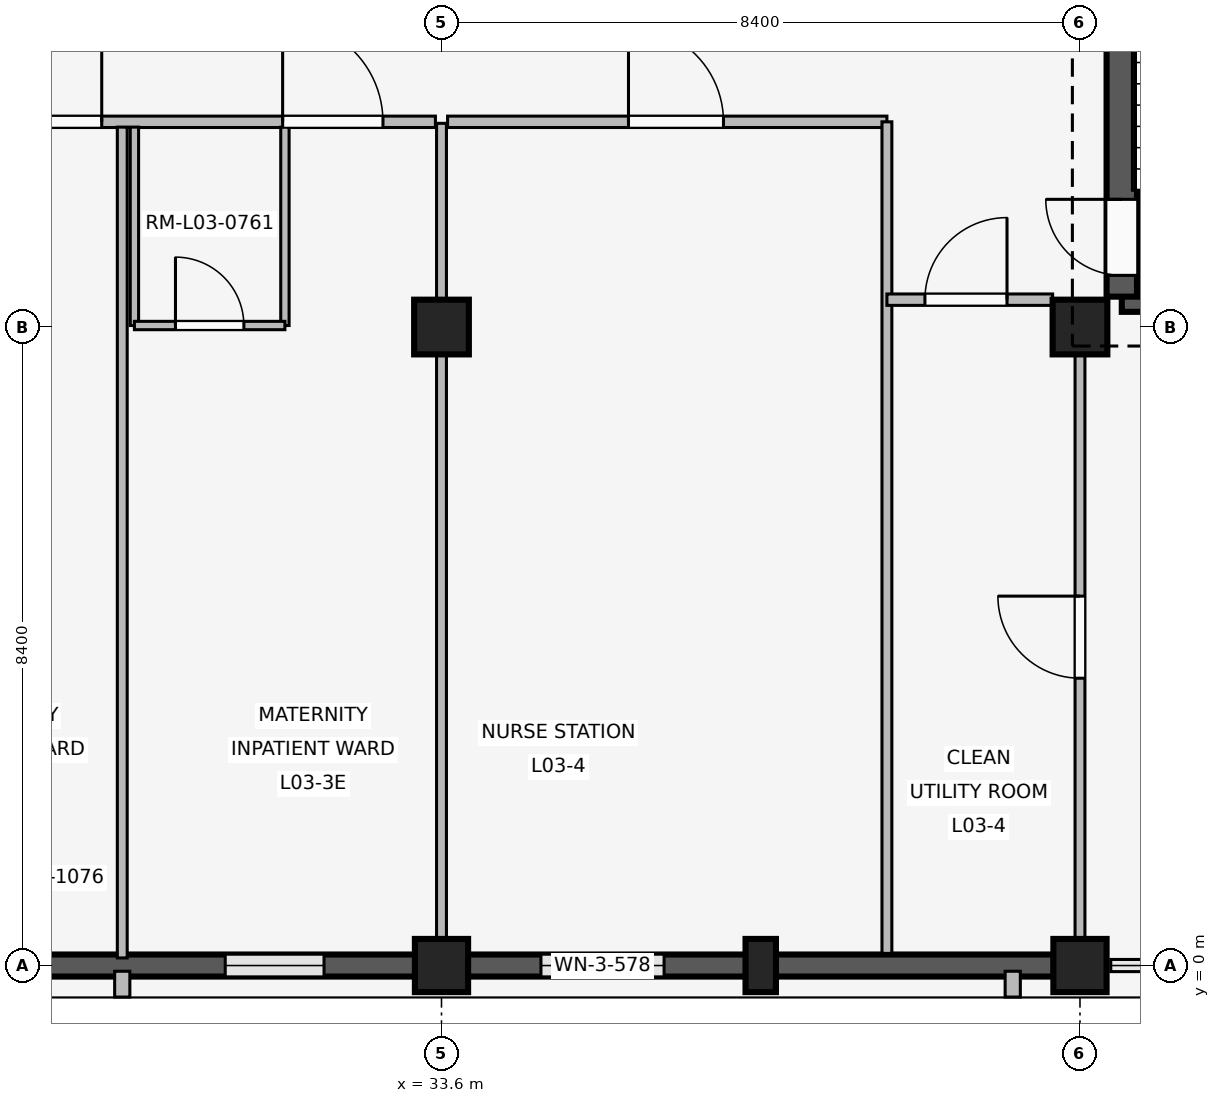
"""IFC4 building model, lengths in metres.
Left out: names, types, materials, properties, quantities, classifications, styles, units other than length and angle.
Written with IfcOpenShell. Run it as: python <this file> out.ifc"""

import sys

from ifc_helpers import new_model, si_unit, direction, frame, frame_2d, origin, origin_2d, place, context, subcontext, project, spatial, rectangle, extrude, element, fill, save


model = new_model("IFC4")
c1 = context("Model", 3, precision=1e-05, world=origin(), true_north=direction((0.0, 1.0)))
c2 = subcontext(c1, "Body", "Model", "MODEL_VIEW")
j1 = project(units=[si_unit("LENGTHUNIT", "METRE"), si_unit("PLANEANGLEUNIT", "RADIAN")], contexts=[c1])
p1 = place(None, origin())
s1 = spatial("IfcSite", under=j1, at=p1, CompositionType="ELEMENT")
p2 = place(p1, origin())
s2 = spatial("IfcBuilding", under=s1, at=p2, CompositionType="ELEMENT")
p3 = place(p2, frame((0.0, 0.0, 12.9)))
s3 = spatial("IfcBuildingStorey", under=s2, at=p3, CompositionType="ELEMENT", Elevation=12.9)
p4 = place(p3, frame((33.6, 0.0, 0.0), z_axis=(0.0, 0.0, 1.0), x_axis=(1.0, 0.0, 0.0)))
e1 = element("IfcColumn", 1, at=p4, inside=s3, PredefinedType="COLUMN", context=c2, shape_type="SweptSolid", body=[
    extrude(rectangle(XDim=0.7, YDim=0.7, at=origin_2d()), origin(), (0.0, 0.0, 1.0), 3.3),
])
p5 = place(p3, frame((33.6, 8.4, 0.0), z_axis=(0.0, 0.0, 1.0), x_axis=(1.0, 0.0, 0.0)))
e2 = element("IfcColumn", 2, at=p5, inside=s3, PredefinedType="COLUMN", context=c2, shape_type="SweptSolid", body=[
    extrude(rectangle(XDim=0.72, YDim=0.72, at=origin_2d()), origin(), (0.0, 0.0, 1.0), 3.3),
])
p6 = place(p3, frame((42.0, 0.0, 0.0), z_axis=(0.0, 0.0, 1.0), x_axis=(1.0, 0.0, 0.0)))
e3 = element("IfcColumn", 3, at=p6, inside=s3, PredefinedType="COLUMN", context=c2, shape_type="SweptSolid", body=[
    extrude(rectangle(XDim=0.7, YDim=0.7, at=origin_2d()), origin(), (0.0, 0.0, 1.0), 3.3),
])
p7 = place(p3, frame((42.0, 8.4, 0.0), z_axis=(0.0, 0.0, 1.0), x_axis=(1.0, 0.0, 0.0)))
e4 = element("IfcColumn", 4, at=p7, inside=s3, PredefinedType="COLUMN", context=c2, shape_type="SweptSolid", body=[
    extrude(rectangle(XDim=0.72, YDim=0.72, at=origin_2d()), origin(), (0.0, 0.0, 1.0), 3.3),
])
p8 = place(p3, frame((37.8, 0.0, 0.0), z_axis=(0.0, 0.0, 1.0), x_axis=(1.0, 0.0, 0.0)))
e5 = element("IfcColumn", 5, at=p8, inside=s3, PredefinedType="PILASTER", context=c2, shape_type="SweptSolid", body=[
    extrude(rectangle(XDim=0.4, YDim=0.7, at=origin_2d()), origin(), (0.0, 0.0, 1.0), 3.3),
])
p9 = place(p3, frame((33.255, 0.0, 0.0), z_axis=(0.0, 0.0, 1.0), x_axis=(-1.0, 0.0, 0.0)))
e6 = element("IfcWall", 6, at=p9, inside=s3, PredefinedType="SOLIDWALL", context=c2, shape_type="SweptSolid", body=[
    extrude(rectangle(XDim=7.71, YDim=0.29, at=frame_2d((3.855, 0.0))), origin(), (0.0, 0.0, 1.0), 2.44),
])
p10 = place(p9, frame((1.2, 0.0, 1.05)))
e7 = element("IfcOpeningElement", 7, at=p10, cuts=e6, PredefinedType="OPENING", context=c2, shape_type="SweptSolid", body=[
    extrude(rectangle(XDim=1.3, YDim=0.75, at=frame_2d((0.65, 0.375))), frame((0.0, 0.155, 0.0), z_axis=(0.0, -1.0, 0.0), x_axis=(1.0, 0.0, 0.0)), (0.0, 0.0, 1.0), 0.31),
])
p11 = place(p9, frame((5.21, 0.0, 1.05)))
e8 = element("IfcOpeningElement", 8, at=p11, cuts=e6, PredefinedType="OPENING", context=c2, shape_type="SweptSolid", body=[
    extrude(rectangle(XDim=1.3, YDim=0.75, at=frame_2d((0.65, 0.375))), frame((0.0, 0.155, 0.0), z_axis=(0.0, -1.0, 0.0), x_axis=(1.0, 0.0, 0.0)), (0.0, 0.0, 1.0), 0.31),
])
p12 = place(p3, frame((29.4, -0.075, 0.0), z_axis=(0.0, 0.0, 1.0), x_axis=(0.0, -1.0, 0.0)))
e9 = element("IfcWall", 9, at=p12, inside=s3, PredefinedType="ELEMENTEDWALL", context=c2, shape_type="SweptSolid", body=[
    extrude(rectangle(XDim=0.34, YDim=0.2, at=frame_2d((0.17, 0.0))), origin(), (0.0, 0.0, 1.0), 2.42),
])
p13 = place(p3, frame((41.655, 0.0, 0.0), z_axis=(0.0, 0.0, 1.0), x_axis=(-1.0, 0.0, 0.0)))
e10 = element("IfcWall", 10, at=p13, inside=s3, PredefinedType="SOLIDWALL", context=c2, shape_type="SweptSolid", body=[
    extrude(rectangle(XDim=7.71, YDim=0.29, at=frame_2d((3.855, 0.0))), origin(), (0.0, 0.0, 1.0), 2.44),
])
p14 = place(p13, frame((5.127, 0.0, 0.85)))
e11 = element("IfcOpeningElement", 11, at=p14, cuts=e10, PredefinedType="OPENING", context=c2, shape_type="SweptSolid", body=[
    extrude(rectangle(XDim=1.62, YDim=0.95, at=frame_2d((0.81, 0.475))), frame((0.0, 0.155, 0.0), z_axis=(0.0, -1.0, 0.0), x_axis=(1.0, 0.0, 0.0)), (0.0, 0.0, 1.0), 0.31),
])
p15 = place(p3, frame((41.115, -0.075, 0.0), z_axis=(0.0, 0.0, 1.0), x_axis=(0.0, -1.0, 0.0)))
e12 = element("IfcWall", 12, at=p15, inside=s3, PredefinedType="ELEMENTEDWALL", context=c2, shape_type="SweptSolid", body=[
    extrude(rectangle(XDim=0.34, YDim=0.2, at=frame_2d((0.17, 0.0))), origin(), (0.0, 0.0, 1.0), 2.42),
])
p16 = place(p3, frame((42.55, 8.8, 0.0), z_axis=(0.0, 0.0, 1.0), x_axis=(1.0, 0.0, 0.0)))
e13 = element("IfcWall", 13, at=p16, inside=s3, PredefinedType="SHEAR", context=c2, shape_type="SweptSolid", body=[
    extrude(rectangle(XDim=7.5, YDim=0.4, at=frame_2d((3.75, 0.0))), origin(), (0.0, 0.0, 1.0), 3.02),
])
p17 = place(p16, frame((4.85, 0.0, 0.0)))
e14 = element("IfcOpeningElement", 14, at=p17, cuts=e13, PredefinedType="OPENING", context=c2, shape_type="SweptSolid", body=[
    extrude(rectangle(XDim=1.2, YDim=2.2, at=frame_2d((0.6, 1.1))), frame((0.0, 0.21, 0.0), z_axis=(0.0, -1.0, 0.0), x_axis=(1.0, 0.0, 0.0)), (0.0, 0.0, 1.0), 0.42),
])
p18 = place(p3, frame((42.55, 8.8, 0.0), z_axis=(0.0, 0.0, 1.0), x_axis=(0.0, 1.0, 0.0)))
e15 = element("IfcWall", 15, at=p18, inside=s3, PredefinedType="SHEAR", context=c2, shape_type="SweptSolid", body=[
    extrude(rectangle(XDim=7.55, YDim=0.4, at=frame_2d((3.775, 0.0))), origin(), (0.0, 0.0, 1.0), 3.02),
])
p19 = place(p18, frame((0.28, 0.0, 0.0)))
e16 = element("IfcOpeningElement", 16, at=p19, cuts=e15, PredefinedType="OPENING", context=c2, shape_type="SweptSolid", body=[
    extrude(rectangle(XDim=1.0, YDim=2.15, at=frame_2d((0.5, 1.075))), frame((0.0, 0.21, 0.0), z_axis=(0.0, -1.0, 0.0), x_axis=(1.0, 0.0, 0.0)), (0.0, 0.0, 1.0), 0.42),
])
p20 = place(p3, frame((25.28, 11.1, 0.0), z_axis=(0.0, 0.0, 1.0), x_axis=(1.0, 0.0, 0.0)))
e17 = element("IfcWall", 17, at=p20, inside=s3, PredefinedType="PARTITIONING", context=c2, shape_type="SweptSolid", body=[
    extrude(rectangle(XDim=8.24, YDim=0.15, at=frame_2d((4.12, 0.0))), origin(), (0.0, 0.0, 1.0), 2.42),
])
p21 = place(p20, frame((2.53, 0.0, 0.0)))
e18 = element("IfcOpeningElement", 18, at=p21, cuts=e17, PredefinedType="OPENING", context=c2, shape_type="SweptSolid", body=[
    extrude(rectangle(XDim=1.32, YDim=2.25, at=frame_2d((0.66, 1.125))), frame((0.0, 0.085, 0.0), z_axis=(0.0, -1.0, 0.0), x_axis=(1.0, 0.0, 0.0)), (0.0, 0.0, 1.0), 0.17),
])
p22 = place(p20, frame((6.23, 0.0, 0.0)))
e19 = element("IfcOpeningElement", 19, at=p22, cuts=e17, PredefinedType="OPENING", context=c2, shape_type="SweptSolid", body=[
    extrude(rectangle(XDim=1.32, YDim=2.25, at=frame_2d((0.66, 1.125))), frame((0.0, 0.085, 0.0), z_axis=(0.0, -1.0, 0.0), x_axis=(1.0, 0.0, 0.0)), (0.0, 0.0, 1.0), 0.17),
])
p23 = place(p3, frame((29.4, 0.1, 0.0), z_axis=(0.0, 0.0, 1.0), x_axis=(0.0, 1.0, 0.0)))
e20 = element("IfcWall", 20, at=p23, inside=s3, PredefinedType="PARTITIONING", context=c2, shape_type="SweptSolid", body=[
    extrude(rectangle(XDim=10.93, YDim=0.13, at=frame_2d((5.465, 0.0))), origin(), (0.0, 0.0, 1.0), 2.42),
])
for number, where, z_axis, x_axis in (
    (21, (29.56, 8.42, 0.0), (0.0, 0.0, 1.0), (0.0, 1.0, 0.0)),
    (22, (31.54, 8.42, 0.0), (0.0, 0.0, 1.0), (0.0, 1.0, 0.0)),
):
    element("IfcWall", number, at=place(p3, frame(where, z_axis=z_axis, x_axis=x_axis)), inside=s3, PredefinedType="PARTITIONING", context=c2, shape_type="SweptSolid", body=[
        extrude(rectangle(XDim=2.61, YDim=0.11, at=frame_2d((1.305, 0.0))), origin(), (0.0, 0.0, 1.0), 2.42),
    ])
p24 = place(p3, frame((29.56, 8.42, 0.0), z_axis=(0.0, 0.0, 1.0), x_axis=(1.0, 0.0, 0.0)))
e23 = element("IfcWall", 23, at=p24, inside=s3, PredefinedType="PARTITIONING", context=c2, shape_type="SweptSolid", body=[
    extrude(rectangle(XDim=1.98, YDim=0.11, at=frame_2d((0.99, 0.0))), origin(), (0.0, 0.0, 1.0), 2.42),
])
p25 = place(p24, frame((0.54, 0.0, 0.0)))
e24 = element("IfcOpeningElement", 24, at=p25, cuts=e23, PredefinedType="OPENING", context=c2, shape_type="SweptSolid", body=[
    extrude(rectangle(XDim=0.9, YDim=2.1, at=frame_2d((0.45, 1.05))), frame((0.0, 0.065, 0.0), z_axis=(0.0, -1.0, 0.0), x_axis=(1.0, 0.0, 0.0)), (0.0, 0.0, 1.0), 0.13),
])
p26 = place(p3, frame((28.05, 1.15, 0.0), z_axis=(0.0, 0.0, 1.0), x_axis=(1.0, 0.0, 0.0)))
e25 = element("IfcWall", 25, at=p26, inside=s3, PredefinedType="PLUMBINGWALL", context=c2, shape_type="SweptSolid", body=[
    extrude(rectangle(XDim=0.9, YDim=0.24, at=frame_2d((0.45, 0.0))), origin(), (0.0, 0.0, 1.0), 2.42),
])
p27 = place(p3, frame((33.6, 0.14, 0.0), z_axis=(0.0, 0.0, 1.0), x_axis=(0.0, 1.0, 0.0)))
e26 = element("IfcWall", 26, at=p27, inside=s3, PredefinedType="PARTITIONING", context=c2, shape_type="SweptSolid", body=[
    extrude(rectangle(XDim=10.94, YDim=0.13, at=frame_2d((5.47, 0.0))), origin(), (0.0, 0.0, 1.0), 2.42),
])
p28 = place(p3, frame((33.68, 11.1, 0.0), z_axis=(0.0, 0.0, 1.0), x_axis=(1.0, 0.0, 0.0)))
e27 = element("IfcWall", 27, at=p28, inside=s3, PredefinedType="PARTITIONING", context=c2, shape_type="SweptSolid", body=[
    extrude(rectangle(XDim=5.78, YDim=0.15, at=frame_2d((2.89, 0.0))), origin(), (0.0, 0.0, 1.0), 2.42),
])
p29 = place(p28, frame((2.38, 0.0, 0.0)))
e28 = element("IfcOpeningElement", 28, at=p29, cuts=e27, PredefinedType="OPENING", context=c2, shape_type="SweptSolid", body=[
    extrude(rectangle(XDim=1.25, YDim=2.2, at=frame_2d((0.625, 1.1))), frame((0.0, 0.085, 0.0), z_axis=(0.0, -1.0, 0.0), x_axis=(1.0, 0.0, 0.0)), (0.0, 0.0, 1.0), 0.17),
])
p30 = place(p3, frame((39.46, 0.16, 0.0), z_axis=(0.0, 0.0, 1.0), x_axis=(0.0, 1.0, 0.0)))
e29 = element("IfcWall", 29, at=p30, inside=s3, PredefinedType="PARTITIONING", context=c2, shape_type="SweptSolid", body=[
    extrude(rectangle(XDim=10.94, YDim=0.13, at=frame_2d((5.47, 0.0))), origin(), (0.0, 0.0, 1.0), 2.42),
])
p31 = place(p3, frame((39.46, 8.76, 0.0), z_axis=(0.0, 0.0, 1.0), x_axis=(1.0, 0.0, 0.0)))
e30 = element("IfcWall", 30, at=p31, inside=s3, PredefinedType="PARTITIONING", context=c2, shape_type="SweptSolid", body=[
    extrude(rectangle(XDim=2.18, YDim=0.15, at=frame_2d((1.09, 0.0))), origin(), (0.0, 0.0, 1.0), 2.42),
])
p32 = place(p31, frame((0.5, 0.0, 0.0)))
e31 = element("IfcOpeningElement", 31, at=p32, cuts=e30, PredefinedType="OPENING", context=c2, shape_type="SweptSolid", body=[
    extrude(rectangle(XDim=1.08, YDim=2.15, at=frame_2d((0.54, 1.075))), frame((0.0, 0.085, 0.0), z_axis=(0.0, -1.0, 0.0), x_axis=(1.0, 0.0, 0.0)), (0.0, 0.0, 1.0), 0.17),
])
p33 = place(p3, frame((42.0, 0.14, 0.0), z_axis=(0.0, 0.0, 1.0), x_axis=(0.0, 1.0, 0.0)))
e32 = element("IfcWall", 32, at=p33, inside=s3, PredefinedType="PARTITIONING", context=c2, shape_type="SweptSolid", body=[
    extrude(rectangle(XDim=8.21, YDim=0.13, at=frame_2d((4.105, 0.0))), origin(), (0.0, 0.0, 1.0), 2.42),
])
p34 = place(p33, frame((3.64, 0.0, 0.0)))
e33 = element("IfcOpeningElement", 33, at=p34, cuts=e32, PredefinedType="OPENING", context=c2, shape_type="SweptSolid", body=[
    extrude(rectangle(XDim=1.08, YDim=2.15, at=frame_2d((0.54, 1.075))), frame((0.0, 0.075, 0.0), z_axis=(0.0, -1.0, 0.0), x_axis=(1.0, 0.0, 0.0)), (0.0, 0.0, 1.0), 0.15),
])
p35 = place(p10, origin())
e34 = element("IfcWindow", 34, at=p35, inside=s3, PartitioningType="SINGLE_PANEL", PredefinedType="WINDOW", context=c2, shape_type="SweptSolid", body=[
    extrude(rectangle(XDim=1.3, YDim=0.75, at=frame_2d((0.65, 0.375))), frame((0.0, 0.03, 0.0), z_axis=(0.0, -1.0, 0.0), x_axis=(1.0, 0.0, 0.0)), (0.0, 0.0, 1.0), 0.06),
])
fill(e7, e34)
p36 = place(p14, origin())
e35 = element("IfcWindow", 35, at=p36, inside=s3, PartitioningType="SINGLE_PANEL", PredefinedType="WINDOW", context=c2, shape_type="SweptSolid", body=[
    extrude(rectangle(XDim=1.62, YDim=0.95, at=frame_2d((0.81, 0.475))), frame((0.0, 0.03, 0.0), z_axis=(0.0, -1.0, 0.0), x_axis=(1.0, 0.0, 0.0)), (0.0, 0.0, 1.0), 0.06),
])
fill(e11, e35)
p37 = place(p19, origin())
e36 = element("IfcDoor", 36, at=p37, inside=s3, OperationType="SINGLE_SWING_RIGHT", PredefinedType="DOOR", context=c2, shape_type="SweptSolid", body=[
    extrude(rectangle(XDim=1.0, YDim=2.15, at=frame_2d((0.5, 1.075))), frame((0.0, 0.025, 0.0), z_axis=(0.0, -1.0, 0.0), x_axis=(1.0, 0.0, 0.0)), (0.0, 0.0, 1.0), 0.05),
])
fill(e16, e36)
p38 = place(p21, origin())
e37 = element("IfcDoor", 37, at=p38, inside=s3, OperationType="SINGLE_SWING_RIGHT", PredefinedType="DOOR", context=c2, shape_type="SweptSolid", body=[
    extrude(rectangle(XDim=1.32, YDim=2.25, at=frame_2d((0.66, 1.125))), frame((0.0, 0.025, 0.0), z_axis=(0.0, -1.0, 0.0), x_axis=(1.0, 0.0, 0.0)), (0.0, 0.0, 1.0), 0.05),
])
fill(e18, e37)
p39 = place(p22, origin())
e38 = element("IfcDoor", 38, at=p39, inside=s3, OperationType="SINGLE_SWING_LEFT", PredefinedType="DOOR", context=c2, shape_type="SweptSolid", body=[
    extrude(rectangle(XDim=1.32, YDim=2.25, at=frame_2d((0.66, 1.125))), frame((0.0, 0.025, 0.0), z_axis=(0.0, -1.0, 0.0), x_axis=(1.0, 0.0, 0.0)), (0.0, 0.0, 1.0), 0.05),
])
fill(e19, e38)
p40 = place(p25, origin())
e39 = element("IfcDoor", 39, at=p40, inside=s3, OperationType="SINGLE_SWING_LEFT", PredefinedType="DOOR", context=c2, shape_type="SweptSolid", body=[
    extrude(rectangle(XDim=0.9, YDim=2.1, at=frame_2d((0.45, 1.05))), frame((0.0, 0.025, 0.0), z_axis=(0.0, -1.0, 0.0), x_axis=(1.0, 0.0, 0.0)), (0.0, 0.0, 1.0), 0.05),
])
fill(e24, e39)
p41 = place(p29, origin())
e40 = element("IfcDoor", 40, at=p41, inside=s3, OperationType="SINGLE_SWING_LEFT", PredefinedType="DOOR", context=c2, shape_type="SweptSolid", body=[
    extrude(rectangle(XDim=1.25, YDim=2.2, at=frame_2d((0.625, 1.1))), frame((0.0, 0.025, 0.0), z_axis=(0.0, -1.0, 0.0), x_axis=(1.0, 0.0, 0.0)), (0.0, 0.0, 1.0), 0.05),
])
fill(e28, e40)
p42 = place(p32, origin())
e41 = element("IfcDoor", 41, at=p42, inside=s3, OperationType="SINGLE_SWING_RIGHT", PredefinedType="DOOR", context=c2, shape_type="SweptSolid", body=[
    extrude(rectangle(XDim=1.08, YDim=2.15, at=frame_2d((0.54, 1.075))), frame((0.0, 0.025, 0.0), z_axis=(0.0, -1.0, 0.0), x_axis=(1.0, 0.0, 0.0)), (0.0, 0.0, 1.0), 0.05),
])
fill(e31, e41)
p43 = place(p34, origin())
e42 = element("IfcDoor", 42, at=p43, inside=s3, OperationType="SINGLE_SWING_RIGHT", PredefinedType="DOOR", context=c2, shape_type="SweptSolid", body=[
    extrude(rectangle(XDim=1.08, YDim=2.15, at=frame_2d((0.54, 1.075))), frame((0.0, 0.025, 0.0), z_axis=(0.0, -1.0, 0.0), x_axis=(1.0, 0.0, 0.0)), (0.0, 0.0, 1.0), 0.05),
])
fill(e33, e42)
save(model, sys.argv[1])
